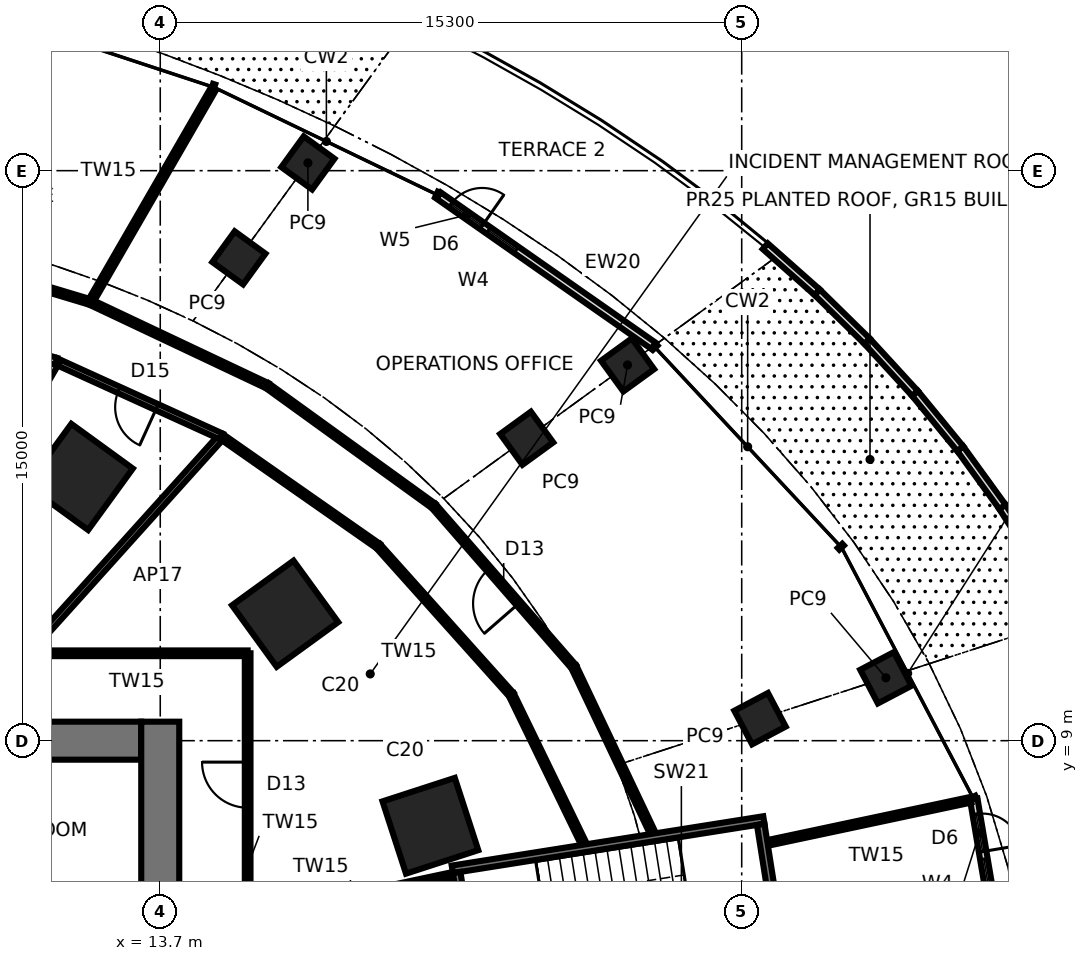
"""IFC4 building model, lengths in metres.
Left out: names, types, materials, properties, quantities, classifications, styles, units other than length and angle.
Written with IfcOpenShell. Run it as: python <this file> out.ifc"""

import sys

from ifc_helpers import new_model, si_unit, direction, frame, frame_2d, origin, origin_2d, place, context, subcontext, project, spatial, rectangle, extrude, element, fill, save


model = new_model("IFC4")
c1 = context("Model", 3, precision=1e-05, world=origin(), true_north=direction((0.0, 1.0)))
c2 = subcontext(c1, "Body", "Model", "MODEL_VIEW")
j1 = project(units=[si_unit("LENGTHUNIT", "METRE"), si_unit("PLANEANGLEUNIT", "RADIAN")], contexts=[c1])
p1 = place(None, origin())
s1 = spatial("IfcSite", under=j1, at=p1, CompositionType="ELEMENT")
p2 = place(p1, origin())
s2 = spatial("IfcBuilding", under=s1, at=p2, CompositionType="ELEMENT")
p3 = place(p2, frame((0.0, 0.0, 10.6)))
s3 = spatial("IfcBuildingStorey", under=s2, at=p3, CompositionType="ELEMENT", Elevation=10.6)
for number, where, z_axis, x_axis in (
    (1, (20.808, 6.761, 0.0), (0.0, 0.0, 1.0), (0.951, 0.309, 0.0)),
    (2, (16.986, 12.341, 0.0), (0.0, 0.0, 1.0), (0.809, 0.588, 0.0)),
    (3, (11.581, 15.94, 0.0), (0.0, 0.0, 1.0), (0.588, 0.809, 0.0)),
):
    element("IfcColumn", number, at=place(p3, frame(where, z_axis=z_axis, x_axis=x_axis)), inside=s3, PredefinedType="COLUMN", context=c2, shape_type="SweptSolid", body=[
        extrude(rectangle(XDim=2.0, YDim=2.0, at=origin_2d()), origin(), (0.0, 0.0, 1.0), 4.5),
    ])
for number, where, z_axis, x_axis in (
    (4, (32.794, 10.655, 0.0), (0.0, 0.0, 1.0), (0.885, 0.465, 0.0)),
    (5, (25.997, 18.888, 0.0), (0.0, 0.0, 1.0), (0.809, 0.588, 0.0)),
    (6, (17.585, 24.204, 0.0), (0.0, 0.0, 1.0), (0.588, 0.809, 0.0)),
    (7, (29.482, 9.579, 0.0), (0.0, 0.0, 1.0), (0.884, 0.467, 0.0)),
    (8, (23.342, 16.959, 0.0), (0.0, 0.0, 1.0), (0.809, 0.588, 0.0)),
    (9, (15.77, 21.705, 0.0), (0.0, 0.0, 1.0), (0.588, 0.809, 0.0)),
):
    element("IfcColumn", number, at=place(p3, frame(where, z_axis=z_axis, x_axis=x_axis)), inside=s3, PredefinedType="COLUMN", context=c2, shape_type="SweptSolid", body=[
        extrude(rectangle(XDim=1.0, YDim=1.0, at=origin_2d()), origin(), (0.0, 0.0, 1.0), 4.5),
    ])
p4 = place(p3, frame((13.2, 9.0, 0.0), z_axis=(0.0, 0.0, 1.0), x_axis=(-1.0, 0.0, 0.0)))
e10 = element("IfcWall", 10, at=p4, inside=s3, PredefinedType="SHEAR", context=c2, shape_type="SweptSolid", body=[
    extrude(rectangle(XDim=26.4, YDim=1.0, at=frame_2d((13.2, 0.0))), origin(), (0.0, 0.0, 1.0), 4.5),
])
p5 = place(p4, frame((2.65, 0.0, 0.0)))
e11 = element("IfcOpeningElement", 11, at=p5, cuts=e10, PredefinedType="OPENING", context=c2, shape_type="SweptSolid", body=[
    extrude(rectangle(XDim=0.9, YDim=2.1, at=frame_2d((0.45, 1.05))), frame((0.0, 0.51, 0.0), z_axis=(0.0, -1.0, 0.0), x_axis=(1.0, 0.0, 0.0)), (0.0, 0.0, 1.0), 1.02),
])
p6 = place(p4, frame((9.5, 0.0, 0.0)))
e12 = element("IfcOpeningElement", 12, at=p6, cuts=e10, PredefinedType="OPENING", context=c2, shape_type="SweptSolid", body=[
    extrude(rectangle(XDim=0.9, YDim=2.1, at=frame_2d((0.45, 1.05))), frame((0.0, 0.51, 0.0), z_axis=(0.0, -1.0, 0.0), x_axis=(1.0, 0.0, 0.0)), (0.0, 0.0, 1.0), 1.02),
])
p7 = place(p4, frame((16.0, 0.0, 0.0)))
e13 = element("IfcOpeningElement", 13, at=p7, cuts=e10, PredefinedType="OPENING", context=c2, shape_type="SweptSolid", body=[
    extrude(rectangle(XDim=0.9, YDim=2.1, at=frame_2d((0.45, 1.05))), frame((0.0, 0.51, 0.0), z_axis=(0.0, -1.0, 0.0), x_axis=(1.0, 0.0, 0.0)), (0.0, 0.0, 1.0), 1.02),
])
p8 = place(p4, frame((21.25, 0.0, 0.0)))
e14 = element("IfcOpeningElement", 14, at=p8, cuts=e10, PredefinedType="OPENING", context=c2, shape_type="SweptSolid", body=[
    extrude(rectangle(XDim=0.9, YDim=2.1, at=frame_2d((0.45, 1.05))), frame((0.0, 0.51, 0.0), z_axis=(0.0, -1.0, 0.0), x_axis=(1.0, 0.0, 0.0)), (0.0, 0.0, 1.0), 1.02),
])
p9 = place(p4, frame((24.8, 0.0, 0.0)))
e15 = element("IfcOpeningElement", 15, at=p9, cuts=e10, PredefinedType="OPENING", context=c2, shape_type="SweptSolid", body=[
    extrude(rectangle(XDim=1.0, YDim=2.1, at=frame_2d((0.5, 1.05))), frame((0.0, 0.51, 0.0), z_axis=(0.0, -1.0, 0.0), x_axis=(1.0, 0.0, 0.0)), (0.0, 0.0, 1.0), 1.02),
])
p10 = place(p3, frame((13.7, -9.5, 0.0), z_axis=(0.0, 0.0, 1.0), x_axis=(0.0, 1.0, 0.0)))
e16 = element("IfcWall", 16, at=p10, inside=s3, PredefinedType="SHEAR", context=c2, shape_type="SweptSolid", body=[
    extrude(rectangle(XDim=19.0, YDim=1.0, at=frame_2d((9.5, 0.0))), origin(), (0.0, 0.0, 1.0), 4.5),
])
p11 = place(p10, frame((8.6, 0.0, 0.0)))
e17 = element("IfcOpeningElement", 17, at=p11, cuts=e16, PredefinedType="OPENING", context=c2, shape_type="SweptSolid", body=[
    extrude(rectangle(XDim=1.8, YDim=2.4, at=frame_2d((0.9, 1.2))), frame((0.0, 0.51, 0.0), z_axis=(0.0, -1.0, 0.0), x_axis=(1.0, 0.0, 0.0)), (0.0, 0.0, 1.0), 1.02),
])
p12 = place(p3, frame((36.37, 0.0, 0.0), z_axis=(0.0, 0.0, 1.0), x_axis=(-0.167128957737, 0.985935044253, 0.0)))
e18 = element("IfcWall", 18, at=p12, inside=s3, PredefinedType="SOLIDWALL", context=c2, shape_type="SweptSolid", body=[
    extrude(rectangle(XDim=7.568, YDim=0.2, at=frame_2d((3.784, 0.0))), origin(), (0.0, 0.0, 1.0), 4.3),
])
p13 = place(p12, frame((6.168, 0.0, 0.0)))
e19 = element("IfcOpeningElement", 19, at=p13, cuts=e18, PredefinedType="OPENING", context=c2, shape_type="SweptSolid", body=[
    extrude(rectangle(XDim=1.0, YDim=2.4, at=frame_2d((0.5, 1.2))), frame((0.0, 0.11, 0.0), z_axis=(0.0, -1.0, 0.0), x_axis=(1.0, 0.0, 0.0)), (0.0, 0.0, 1.0), 0.22),
])
p14 = place(p12, frame((5.068, 0.0, 0.3)))
e20 = element("IfcOpeningElement", 20, at=p14, cuts=e18, PredefinedType="OPENING", context=c2, shape_type="SweptSolid", body=[
    extrude(rectangle(XDim=0.9, YDim=2.1, at=frame_2d((0.45, 1.05))), frame((0.0, 0.11, 0.0), z_axis=(0.0, -1.0, 0.0), x_axis=(1.0, 0.0, 0.0)), (0.0, 0.0, 1.0), 0.22),
])
p15 = place(p12, frame((6.168, 0.0, 2.7)))
e21 = element("IfcOpeningElement", 21, at=p15, cuts=e18, PredefinedType="OPENING", context=c2, shape_type="SweptSolid", body=[
    extrude(rectangle(XDim=1.0, YDim=0.6, at=frame_2d((0.5, 0.3))), frame((0.0, 0.11, 0.0), z_axis=(0.0, -1.0, 0.0), x_axis=(1.0, 0.0, 0.0)), (0.0, 0.0, 1.0), 0.22),
])
p16 = place(p3, frame((26.684, 19.387, 0.0), z_axis=(0.0, 0.0, 1.0), x_axis=(-0.81941448175, 0.573201454202, 0.0)))
e22 = element("IfcWall", 22, at=p16, inside=s3, PredefinedType="SOLIDWALL", context=c2, shape_type="SweptSolid", body=[
    extrude(rectangle(XDim=6.909, YDim=0.2, at=frame_2d((3.455, 0.0))), origin(), (0.0, 0.0, 1.0), 4.3),
])
p17 = place(p16, frame((5.51, 0.0, 0.0)))
e23 = element("IfcOpeningElement", 23, at=p17, cuts=e22, PredefinedType="OPENING", context=c2, shape_type="SweptSolid", body=[
    extrude(rectangle(XDim=1.0, YDim=2.4, at=frame_2d((0.5, 1.2))), frame((0.0, 0.11, 0.0), z_axis=(0.0, -1.0, 0.0), x_axis=(1.0, 0.0, 0.0)), (0.0, 0.0, 1.0), 0.22),
])
p18 = place(p16, frame((4.409, 0.0, 0.3)))
e24 = element("IfcOpeningElement", 24, at=p18, cuts=e22, PredefinedType="OPENING", context=c2, shape_type="SweptSolid", body=[
    extrude(rectangle(XDim=0.9, YDim=2.1, at=frame_2d((0.45, 1.05))), frame((0.0, 0.11, 0.0), z_axis=(0.0, -1.0, 0.0), x_axis=(1.0, 0.0, 0.0)), (0.0, 0.0, 1.0), 0.22),
])
p19 = place(p16, frame((5.51, 0.0, 2.7)))
e25 = element("IfcOpeningElement", 25, at=p19, cuts=e22, PredefinedType="OPENING", context=c2, shape_type="SweptSolid", body=[
    extrude(rectangle(XDim=1.0, YDim=0.6, at=frame_2d((0.5, 0.3))), frame((0.0, 0.11, 0.0), z_axis=(0.0, -1.0, 0.0), x_axis=(1.0, 0.0, 0.0)), (0.0, 0.0, 1.0), 0.22),
])
p20 = place(p3, frame((36.881, 13.544, 0.0), z_axis=(0.0, 0.0, 1.0), x_axis=(-0.535606646931, 0.844467595449, 0.0)))
e26 = element("IfcWall", 26, at=p20, inside=s3, PredefinedType="PARAPET", context=c2, shape_type="SweptSolid", body=[
    extrude(rectangle(XDim=1.906, YDim=0.2, at=frame_2d((0.953, 0.0))), origin(), (0.0, 0.0, 1.0), 1.1),
])
p21 = place(p3, frame((35.861, 15.153, 0.0), z_axis=(0.0, 0.0, 1.0), x_axis=(-0.58683652807, 0.809705433675, 0.0)))
e27 = element("IfcWall", 27, at=p21, inside=s3, PredefinedType="PARAPET", context=c2, shape_type="SweptSolid", body=[
    extrude(rectangle(XDim=1.893, YDim=0.2, at=frame_2d((0.946, 0.0))), origin(), (0.0, 0.0, 1.0), 1.1),
])
p22 = place(p3, frame((34.75, 16.686, 0.0), z_axis=(0.0, 0.0, 1.0), x_axis=(-0.633563348665, 0.773690818886, 0.0)))
e28 = element("IfcWall", 28, at=p22, inside=s3, PredefinedType="PARAPET", context=c2, shape_type="SweptSolid", body=[
    extrude(rectangle(XDim=1.878, YDim=0.2, at=frame_2d((0.939, 0.0))), origin(), (0.0, 0.0, 1.0), 1.1),
])
p23 = place(p3, frame((33.56, 18.139, 0.0), z_axis=(0.0, 0.0, 1.0), x_axis=(-0.67596210735, 0.736936380855, 0.0)))
e29 = element("IfcWall", 29, at=p23, inside=s3, PredefinedType="PARAPET", context=c2, shape_type="SweptSolid", body=[
    extrude(rectangle(XDim=1.862, YDim=0.2, at=frame_2d((0.931, 0.0))), origin(), (0.0, 0.0, 1.0), 1.1),
])
p24 = place(p3, frame((32.301, 19.511, 0.0), z_axis=(0.0, 0.0, 1.0), x_axis=(-0.714091012731, 0.700052873386, 0.0)))
e30 = element("IfcWall", 30, at=p24, inside=s3, PredefinedType="PARAPET", context=c2, shape_type="SweptSolid", body=[
    extrude(rectangle(XDim=1.844, YDim=0.2, at=frame_2d((0.922, 0.0))), origin(), (0.0, 0.0, 1.0), 1.1),
])
p25 = place(p3, frame((30.985, 20.802, 0.0), z_axis=(0.0, 0.0, 1.0), x_axis=(-0.748198942799, 0.66347444713, 0.0)))
e31 = element("IfcWall", 31, at=p25, inside=s3, PredefinedType="PARAPET", context=c2, shape_type="SweptSolid", body=[
    extrude(rectangle(XDim=1.824, YDim=0.2, at=frame_2d((0.912, 0.0))), origin(), (0.0, 0.0, 1.0), 1.1),
])
p26 = place(p3, frame((29.679, 6.308, 0.0), z_axis=(0.0, 0.0, 1.0), x_axis=(0.97814284779, 0.207934050402, 0.0)))
e32 = element("IfcWall", 32, at=p26, inside=s3, PredefinedType="PARTITIONING", context=c2, shape_type="SweptSolid", body=[
    extrude(rectangle(XDim=5.468, YDim=0.15, at=frame_2d((2.734, 0.0))), origin(), (0.0, 0.0, 1.0), 4.3),
])
p27 = place(p3, frame((21.408, 5.47, 0.0), z_axis=(0.0, 0.0, 1.0), x_axis=(-0.978148748832, -0.207906289368, 0.0)))
e33 = element("IfcWall", 33, at=p27, inside=s3, PredefinedType="PARTITIONING", context=c2, shape_type="SweptSolid", body=[
    extrude(rectangle(XDim=5.529, YDim=0.15, at=frame_2d((2.764, 0.0))), origin(), (0.0, 0.0, 1.0), 4.3),
])
p28 = place(p3, frame((26.666, 6.552, 0.0), z_axis=(0.0, 0.0, 1.0), x_axis=(-0.428597870995, 0.903495359688, 0.0)))
e34 = element("IfcWall", 34, at=p28, inside=s3, PredefinedType="PARTITIONING", context=c2, shape_type="SweptSolid", body=[
    extrude(rectangle(XDim=4.862, YDim=0.15, at=frame_2d((2.431, 0.0))), origin(), (0.0, 0.0, 1.0), 4.3),
])
p29 = place(p3, frame((22.938, 10.212, 0.0), z_axis=(0.0, 0.0, 1.0), x_axis=(0.436655701608, -0.899628700217, 0.0)))
e35 = element("IfcWall", 35, at=p29, inside=s3, PredefinedType="PARTITIONING", context=c2, shape_type="SweptSolid", body=[
    extrude(rectangle(XDim=4.388, YDim=0.15, at=frame_2d((2.194, 0.0))), origin(), (0.0, 0.0, 1.0), 4.3),
])
p30 = place(p3, frame((16.0, 4.321, 0.0), z_axis=(0.0, 0.0, 1.0), x_axis=(0.0, 1.0, 0.0)))
e36 = element("IfcWall", 36, at=p30, inside=s3, PredefinedType="PARTITIONING", context=c2, shape_type="SweptSolid", body=[
    extrude(rectangle(XDim=6.979, YDim=0.15, at=frame_2d((3.49, 0.0))), origin(), (0.0, 0.0, 1.0), 4.3),
])
p31 = place(p30, frame((2.915, 0.0, 0.0)))
e37 = element("IfcOpeningElement", 37, at=p31, cuts=e36, PredefinedType="OPENING", context=c2, shape_type="SweptSolid", body=[
    extrude(rectangle(XDim=1.2, YDim=2.4, at=frame_2d((0.6, 1.2))), frame((0.0, 0.085, 0.0), z_axis=(0.0, -1.0, 0.0), x_axis=(1.0, 0.0, 0.0)), (0.0, 0.0, 1.0), 0.17),
])
p32 = place(p3, frame((19.436, 14.121, 0.0), z_axis=(0.0, 0.0, 1.0), x_axis=(0.667266603128, -0.744818958103, 0.0)))
e38 = element("IfcWall", 38, at=p32, inside=s3, PredefinedType="PARTITIONING", context=c2, shape_type="SweptSolid", body=[
    extrude(rectangle(XDim=5.248, YDim=0.15, at=frame_2d((2.624, 0.0))), origin(), (0.0, 0.0, 1.0), 4.3),
])
p33 = place(p3, frame((24.582, 10.945, 0.0), z_axis=(0.0, 0.0, 1.0), x_axis=(-0.656952161656, 0.753932263069, 0.0)))
e39 = element("IfcWall", 39, at=p33, inside=s3, PredefinedType="PARTITIONING", context=c2, shape_type="SweptSolid", body=[
    extrude(rectangle(XDim=5.616, YDim=0.15, at=frame_2d((2.808, 0.0))), origin(), (0.0, 0.0, 1.0), 4.3),
])
p34 = place(p33, frame((2.208, 0.0, 0.0)))
e40 = element("IfcOpeningElement", 40, at=p34, cuts=e39, PredefinedType="OPENING", context=c2, shape_type="SweptSolid", body=[
    extrude(rectangle(XDim=1.2, YDim=2.4, at=frame_2d((0.6, 1.2))), frame((0.0, 0.085, 0.0), z_axis=(0.0, -1.0, 0.0), x_axis=(1.0, 0.0, 0.0)), (0.0, 0.0, 1.0), 0.17),
])
p35 = place(p3, frame((16.0, 11.3, 0.0), z_axis=(0.0, 0.0, 1.0), x_axis=(-1.0, 0.0, 0.0)))
e41 = element("IfcWall", 41, at=p35, inside=s3, PredefinedType="PARTITIONING", context=c2, shape_type="SweptSolid", body=[
    extrude(rectangle(XDim=5.825, YDim=0.15, at=frame_2d((2.913, 0.0))), origin(), (0.0, 0.0, 1.0), 4.3),
])
p36 = place(p3, frame((15.311, 17.004, 0.0), z_axis=(0.0, 0.0, 1.0), x_axis=(0.819662413359, -0.572846862719, 0.0)))
e42 = element("IfcWall", 42, at=p36, inside=s3, PredefinedType="PARTITIONING", context=c2, shape_type="SweptSolid", body=[
    extrude(rectangle(XDim=5.033, YDim=0.15, at=frame_2d((2.517, 0.0))), origin(), (0.0, 0.0, 1.0), 4.3),
])
p37 = place(p3, frame((20.892, 15.179, 0.0), z_axis=(0.0, 0.0, 1.0), x_axis=(-0.810528990045, 0.585698519971, 0.0)))
e43 = element("IfcWall", 43, at=p37, inside=s3, PredefinedType="PARTITIONING", context=c2, shape_type="SweptSolid", body=[
    extrude(rectangle(XDim=5.4, YDim=0.15, at=frame_2d((2.7, 0.0))), origin(), (0.0, 0.0, 1.0), 4.3),
])
p38 = place(p3, frame((10.175, 11.3, 0.0), z_axis=(0.0, 0.0, 1.0), x_axis=(0.669129902119, 0.743145459577, 0.0)))
e44 = element("IfcWall", 44, at=p38, inside=s3, PredefinedType="PARTITIONING", context=c2, shape_type="SweptSolid", body=[
    extrude(rectangle(XDim=7.676, YDim=0.17, at=frame_2d((3.838, 0.0))), origin(), (0.0, 0.0, 1.0), 4.3),
])
p39 = place(p3, frame((10.96, 18.983, 0.0), z_axis=(0.0, 0.0, 1.0), x_axis=(0.91025098655, -0.414056930246, 0.0)))
e45 = element("IfcWall", 45, at=p39, inside=s3, PredefinedType="PARTITIONING", context=c2, shape_type="SweptSolid", body=[
    extrude(rectangle(XDim=4.78, YDim=0.17, at=frame_2d((2.39, 0.0))), origin(), (0.0, 0.0, 1.0), 4.3),
])
p40 = place(p39, frame((1.815, 0.0, 0.0)))
e46 = element("IfcOpeningElement", 46, at=p40, cuts=e45, PredefinedType="OPENING", context=c2, shape_type="SweptSolid", body=[
    extrude(rectangle(XDim=1.1, YDim=2.4, at=frame_2d((0.55, 1.2))), frame((0.0, 0.095, 0.0), z_axis=(0.0, -1.0, 0.0), x_axis=(1.0, 0.0, 0.0)), (0.0, 0.0, 1.0), 0.19),
])
p41 = place(p3, frame((16.515, 18.342, 0.0), z_axis=(0.0, 0.0, 1.0), x_axis=(-0.904108237681, 0.427303515732, 0.0)))
e47 = element("IfcWall", 47, at=p41, inside=s3, PredefinedType="PARTITIONING", context=c2, shape_type="SweptSolid", body=[
    extrude(rectangle(XDim=5.149, YDim=0.15, at=frame_2d((2.574, 0.0))), origin(), (0.0, 0.0, 1.0), 4.3),
])
p42 = place(p3, frame((6.524, 11.3, 0.0), z_axis=(0.0, 0.0, 1.0), x_axis=(0.499995604398, 0.866027941571, 0.0)))
e48 = element("IfcWall", 48, at=p42, inside=s3, PredefinedType="SOLIDWALL", context=c2, shape_type="SweptSolid", body=[
    extrude(rectangle(XDim=8.872, YDim=0.19, at=frame_2d((4.436, 0.0))), origin(), (0.0, 0.0, 1.0), 4.3),
])
p43 = place(p3, frame((11.86, 20.542, 0.0), z_axis=(0.0, 0.0, 1.0), x_axis=(0.500015529916, 0.866016437397, 0.0)))
e49 = element("IfcWall", 49, at=p43, inside=s3, PredefinedType="PARTITIONING", context=c2, shape_type="SweptSolid", body=[
    extrude(rectangle(XDim=6.442, YDim=0.15, at=frame_2d((3.221, 0.0))), origin(), (0.0, 0.0, 1.0), 4.3),
])
p44 = place(p3, frame((6.58, 20.25, 0.0), z_axis=(0.0, 0.0, 1.0), x_axis=(0.960617684211, -0.277873469014, 0.0)))
e50 = element("IfcWall", 50, at=p44, inside=s3, PredefinedType="SOLIDWALL", context=c2, shape_type="SweptSolid", body=[
    extrude(rectangle(XDim=4.56, YDim=0.19, at=frame_2d((2.28, 0.0))), origin(), (0.0, 0.0, 1.0), 4.3),
])
p45 = place(p3, frame((11.86, 20.542, 0.0), z_axis=(0.0, 0.0, 1.0), x_axis=(-0.957658569451, 0.287906346504, 0.0)))
e51 = element("IfcWall", 51, at=p45, inside=s3, PredefinedType="PARTITIONING", context=c2, shape_type="SweptSolid", body=[
    extrude(rectangle(XDim=4.933, YDim=0.15, at=frame_2d((2.466, 0.0))), origin(), (0.0, 0.0, 1.0), 4.3),
])
p46 = place(p45, frame((1.866, 0.0, 0.0)))
e52 = element("IfcOpeningElement", 52, at=p46, cuts=e51, PredefinedType="OPENING", context=c2, shape_type="SweptSolid", body=[
    extrude(rectangle(XDim=1.2, YDim=2.4, at=frame_2d((0.6, 1.2))), frame((0.0, 0.085, 0.0), z_axis=(0.0, -1.0, 0.0), x_axis=(1.0, 0.0, 0.0)), (0.0, 0.0, 1.0), 0.17),
])
p47 = place(p3, frame((21.385, 5.615, 0.0), z_axis=(0.0, 0.0, 1.0), x_axis=(0.987689398324, 0.156427786655, 0.0)))
e53 = element("IfcWall", 53, at=p47, inside=s3, PredefinedType="SOLIDWALL", context=c2, shape_type="SweptSolid", body=[
    extrude(rectangle(XDim=8.3, YDim=0.2, at=frame_2d((4.15, 0.0))), origin(), (0.0, 0.0, 1.0), 4.3),
])
p48 = place(p3, frame((22.156, 1.383, 0.0), z_axis=(0.0, 0.0, 1.0), x_axis=(-0.156428225752, 0.987689328781, 0.0)))
e54 = element("IfcWall", 54, at=p48, inside=s3, PredefinedType="SOLIDWALL", context=c2, shape_type="SweptSolid", body=[
    extrude(rectangle(XDim=4.2, YDim=0.2, at=frame_2d((2.1, 0.0))), origin(), (0.0, 0.0, 1.0), 4.3),
])
p49 = place(p48, frame((2.76, 0.0, 0.0)))
e55 = element("IfcOpeningElement", 55, at=p49, cuts=e54, PredefinedType="OPENING", context=c2, shape_type="SweptSolid", body=[
    extrude(rectangle(XDim=1.0, YDim=2.1, at=frame_2d((0.5, 1.05))), frame((0.0, 0.11, 0.0), z_axis=(0.0, -1.0, 0.0), x_axis=(1.0, 0.0, 0.0)), (0.0, 0.0, 1.0), 0.22),
])
p50 = place(p3, frame((30.157, 2.65, 0.0), z_axis=(0.0, 0.0, 1.0), x_axis=(-0.156419245009, 0.987690751091, 0.0)))
e56 = element("IfcWall", 56, at=p50, inside=s3, PredefinedType="SOLIDWALL", context=c2, shape_type="SweptSolid", body=[
    extrude(rectangle(XDim=4.2, YDim=0.2, at=frame_2d((2.1, 0.0))), origin(), (0.0, 0.0, 1.0), 4.3),
])
p51 = place(p13, frame((1.0, 0.0, 0.0), z_axis=(0.0, 0.0, 1.0), x_axis=(-1.0, 0.0, 0.0)))
e57 = element("IfcDoor", 57, at=p51, inside=s3, OperationType="SINGLE_SWING_RIGHT", PredefinedType="DOOR", context=c2, shape_type="SweptSolid", body=[
    extrude(rectangle(XDim=1.0, YDim=2.4, at=frame_2d((0.5, 1.2))), frame((0.0, 0.025, 0.0), z_axis=(0.0, -1.0, 0.0), x_axis=(1.0, 0.0, 0.0)), (0.0, 0.0, 1.0), 0.05),
])
fill(e19, e57)
p52 = place(p14, origin())
e58 = element("IfcWindow", 58, at=p52, inside=s3, PartitioningType="SINGLE_PANEL", PredefinedType="WINDOW", context=c2, shape_type="SweptSolid", body=[
    extrude(rectangle(XDim=0.9, YDim=2.1, at=frame_2d((0.45, 1.05))), frame((0.0, 0.03, 0.0), z_axis=(0.0, -1.0, 0.0), x_axis=(1.0, 0.0, 0.0)), (0.0, 0.0, 1.0), 0.06),
])
fill(e20, e58)
p53 = place(p15, origin())
e59 = element("IfcWindow", 59, at=p53, inside=s3, PartitioningType="SINGLE_PANEL", PredefinedType="WINDOW", context=c2, shape_type="SweptSolid", body=[
    extrude(rectangle(XDim=1.0, YDim=0.6, at=frame_2d((0.5, 0.3))), frame((0.0, 0.03, 0.0), z_axis=(0.0, -1.0, 0.0), x_axis=(1.0, 0.0, 0.0)), (0.0, 0.0, 1.0), 0.06),
])
fill(e21, e59)
p54 = place(p17, frame((1.0, 0.0, 0.0), z_axis=(0.0, 0.0, 1.0), x_axis=(-1.0, 0.0, 0.0)))
e60 = element("IfcDoor", 60, at=p54, inside=s3, OperationType="SINGLE_SWING_RIGHT", PredefinedType="DOOR", context=c2, shape_type="SweptSolid", body=[
    extrude(rectangle(XDim=1.0, YDim=2.4, at=frame_2d((0.5, 1.2))), frame((0.0, 0.025, 0.0), z_axis=(0.0, -1.0, 0.0), x_axis=(1.0, 0.0, 0.0)), (0.0, 0.0, 1.0), 0.05),
])
fill(e23, e60)
p55 = place(p18, origin())
e61 = element("IfcWindow", 61, at=p55, inside=s3, PartitioningType="SINGLE_PANEL", PredefinedType="WINDOW", context=c2, shape_type="SweptSolid", body=[
    extrude(rectangle(XDim=0.9, YDim=2.1, at=frame_2d((0.45, 1.05))), frame((0.0, 0.03, 0.0), z_axis=(0.0, -1.0, 0.0), x_axis=(1.0, 0.0, 0.0)), (0.0, 0.0, 1.0), 0.06),
])
fill(e24, e61)
p56 = place(p19, origin())
e62 = element("IfcWindow", 62, at=p56, inside=s3, PartitioningType="SINGLE_PANEL", PredefinedType="WINDOW", context=c2, shape_type="SweptSolid", body=[
    extrude(rectangle(XDim=1.0, YDim=0.6, at=frame_2d((0.5, 0.3))), frame((0.0, 0.03, 0.0), z_axis=(0.0, -1.0, 0.0), x_axis=(1.0, 0.0, 0.0)), (0.0, 0.0, 1.0), 0.06),
])
fill(e25, e62)
p57 = place(p31, origin())
e63 = element("IfcDoor", 63, at=p57, inside=s3, OperationType="SINGLE_SWING_RIGHT", PredefinedType="DOOR", context=c2, shape_type="SweptSolid", body=[
    extrude(rectangle(XDim=1.2, YDim=2.4, at=frame_2d((0.6, 1.2))), frame((0.0, 0.025, 0.0), z_axis=(0.0, -1.0, 0.0), x_axis=(1.0, 0.0, 0.0)), (0.0, 0.0, 1.0), 0.05),
])
fill(e37, e63)
p58 = place(p40, frame((1.1, 0.0, 0.0), z_axis=(0.0, 0.0, 1.0), x_axis=(-1.0, 0.0, 0.0)))
e64 = element("IfcDoor", 64, at=p58, inside=s3, OperationType="SINGLE_SWING_LEFT", PredefinedType="DOOR", context=c2, shape_type="SweptSolid", body=[
    extrude(rectangle(XDim=1.1, YDim=2.4, at=frame_2d((0.55, 1.2))), frame((0.0, 0.025, 0.0), z_axis=(0.0, -1.0, 0.0), x_axis=(1.0, 0.0, 0.0)), (0.0, 0.0, 1.0), 0.05),
])
fill(e46, e64)
p59 = place(p34, origin())
e65 = element("IfcDoor", 65, at=p59, inside=s3, OperationType="SINGLE_SWING_LEFT", PredefinedType="DOOR", context=c2, shape_type="SweptSolid", body=[
    extrude(rectangle(XDim=1.2, YDim=2.4, at=frame_2d((0.6, 1.2))), frame((0.0, 0.025, 0.0), z_axis=(0.0, -1.0, 0.0), x_axis=(1.0, 0.0, 0.0)), (0.0, 0.0, 1.0), 0.05),
])
fill(e40, e65)
save(model, sys.argv[1])
